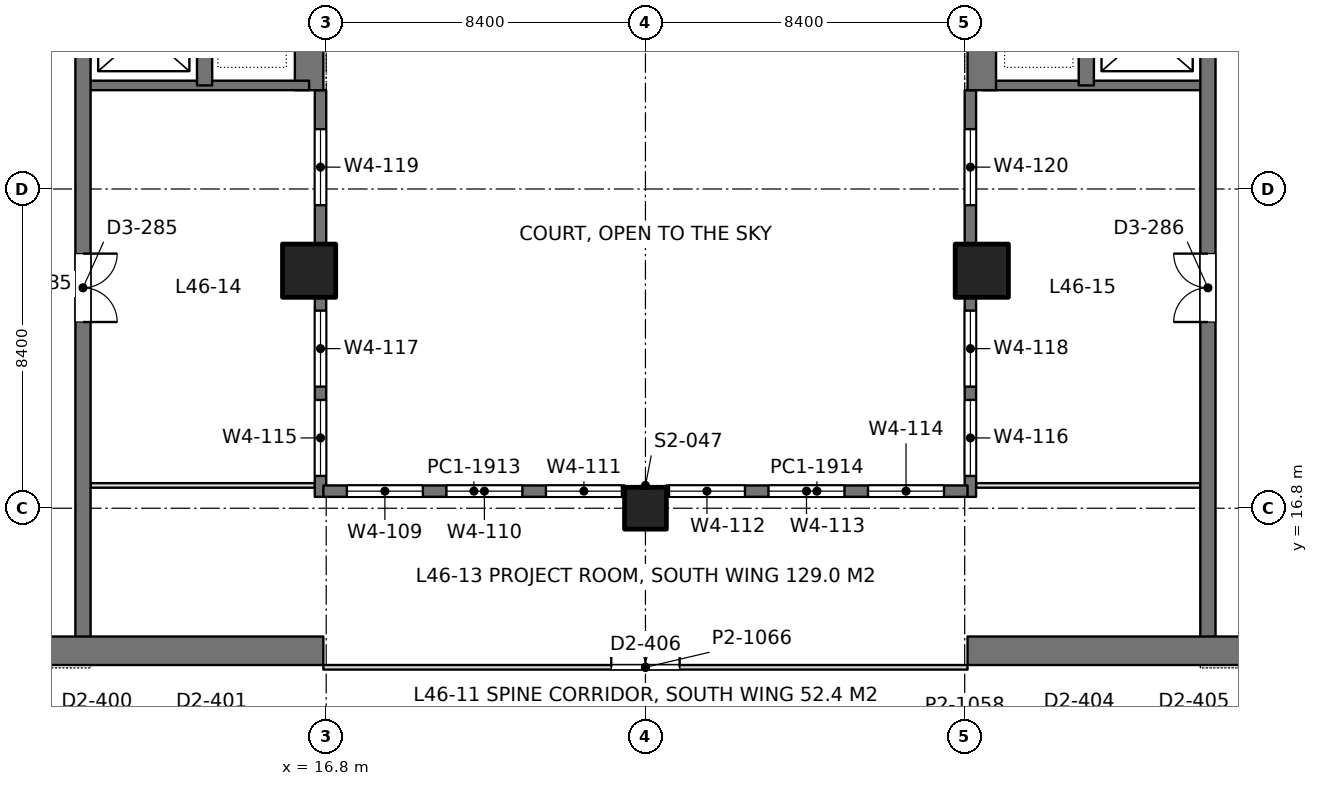
"""IFC4 building model, lengths in metres.
Left out: names, types, materials, properties, quantities, classifications, styles, units other than length and angle.
Written with IfcOpenShell. Run it as: python <this file> out.ifc"""

import sys

from ifc_helpers import new_model, si_unit, direction, frame, frame_2d, origin, origin_2d, place, context, subcontext, project, spatial, rectangle, extrude, element, fill, save


model = new_model("IFC4")
c1 = context("Model", 3, precision=1e-05, world=origin(), true_north=direction((0.0, 1.0)))
c2 = subcontext(c1, "Body", "Model", "MODEL_VIEW")
j1 = project(units=[si_unit("LENGTHUNIT", "METRE"), si_unit("PLANEANGLEUNIT", "RADIAN")], contexts=[c1])
p1 = place(None, origin())
s1 = spatial("IfcSite", under=j1, at=p1, CompositionType="ELEMENT")
p2 = place(p1, origin())
s2 = spatial("IfcBuilding", under=s1, at=p2, CompositionType="ELEMENT")
p3 = place(p2, frame((0.0, 0.0, 202.8)))
s3 = spatial("IfcBuildingStorey", under=s2, at=p3, CompositionType="ELEMENT", Elevation=202.8)
p4 = place(p3, frame((25.2, 16.8, 0.0), z_axis=(0.0, 0.0, 1.0), x_axis=(1.0, 0.0, 0.0)))
e1 = element("IfcColumn", 1, at=p4, inside=s3, PredefinedType="COLUMN", context=c2, shape_type="SweptSolid", body=[
    extrude(rectangle(XDim=1.1, YDim=1.1, at=origin_2d()), origin(), (0.0, 0.0, 1.0), 4.2),
])
for number, where, z_axis, x_axis in (
    (2, (16.35, 23.05, 0.0), (0.0, 0.0, 1.0), (1.0, 0.0, 0.0)),
    (3, (34.05, 23.05, 0.0), (0.0, 0.0, 1.0), (1.0, 0.0, 0.0)),
):
    element("IfcColumn", number, at=place(p3, frame(where, z_axis=z_axis, x_axis=x_axis)), inside=s3, PredefinedType="COLUMN", context=c2, shape_type="SweptSolid", body=[
        extrude(rectangle(XDim=1.4, YDim=1.4, at=origin_2d()), origin(), (0.0, 0.0, 1.0), 4.2),
    ])
p5 = place(p3, frame((-1.125, 13.05, 0.0), z_axis=(0.0, 0.0, 1.0), x_axis=(1.0, 0.0, 0.0)))
e4 = element("IfcWall", 4, at=p5, inside=s3, PredefinedType="SHEAR", context=c2, shape_type="SweptSolid", body=[
    extrude(rectangle(XDim=17.85, YDim=0.75, at=frame_2d((8.925, 0.0))), origin(), (0.0, 0.0, 1.0), 4.2),
])
p6 = place(p5, frame((8.875, 0.0, 0.0)))
e5 = element("IfcOpeningElement", 5, at=p6, cuts=e4, PredefinedType="OPENING", context=c2, shape_type="SweptSolid", body=[
    extrude(rectangle(XDim=1.8, YDim=2.4, at=frame_2d((0.9, 1.2))), frame((0.0, 0.385, 0.0), z_axis=(0.0, -1.0, 0.0), x_axis=(1.0, 0.0, 0.0)), (0.0, 0.0, 1.0), 0.77),
])
p7 = place(p3, frame((16.35, 27.8, 0.0), z_axis=(0.0, 0.0, 1.0), x_axis=(0.0, 1.0, 0.0)))
e6 = element("IfcWall", 6, at=p7, inside=s3, PredefinedType="SHEAR", context=c2, shape_type="SweptSolid", body=[
    extrude(rectangle(XDim=9.55, YDim=0.75, at=frame_2d((4.775, 0.0))), origin(), (0.0, 0.0, 1.0), 4.2),
])
p8 = place(p3, frame((10.4, 13.05, 0.0), z_axis=(0.0, 0.0, 1.0), x_axis=(0.0, 1.0, 0.0)))
e7 = element("IfcWall", 7, at=p8, inside=s3, PredefinedType="SHEAR", context=c2, shape_type="SweptSolid", body=[
    extrude(rectangle(XDim=24.3, YDim=0.4, at=frame_2d((12.15, 0.0))), origin(), (0.0, 0.0, 1.0), 4.2),
])
p9 = place(p8, frame((15.75, 0.0, 0.0)))
e8 = element("IfcOpeningElement", 8, at=p9, cuts=e7, PredefinedType="OPENING", context=c2, shape_type="SweptSolid", body=[
    extrude(rectangle(XDim=1.1, YDim=2.2, at=frame_2d((0.55, 1.1))), frame((0.0, 0.21, 0.0), z_axis=(0.0, -1.0, 0.0), x_axis=(1.0, 0.0, 0.0)), (0.0, 0.0, 1.0), 0.42),
])
p10 = place(p8, frame((18.6, 0.0, 0.0)))
e9 = element("IfcOpeningElement", 9, at=p10, cuts=e7, PredefinedType="OPENING", context=c2, shape_type="SweptSolid", body=[
    extrude(rectangle(XDim=1.1, YDim=2.2, at=frame_2d((0.55, 1.1))), frame((0.0, 0.21, 0.0), z_axis=(0.0, -1.0, 0.0), x_axis=(1.0, 0.0, 0.0)), (0.0, 0.0, 1.0), 0.42),
])
p11 = place(p8, frame((21.45, 0.0, 0.0)))
e10 = element("IfcOpeningElement", 10, at=p11, cuts=e7, PredefinedType="OPENING", context=c2, shape_type="SweptSolid", body=[
    extrude(rectangle(XDim=1.1, YDim=2.2, at=frame_2d((0.55, 1.1))), frame((0.0, 0.21, 0.0), z_axis=(0.0, -1.0, 0.0), x_axis=(1.0, 0.0, 0.0)), (0.0, 0.0, 1.0), 0.42),
])
p12 = place(p8, frame((8.65, 0.0, 0.0)))
e11 = element("IfcOpeningElement", 11, at=p12, cuts=e7, PredefinedType="OPENING", context=c2, shape_type="SweptSolid", body=[
    extrude(rectangle(XDim=1.8, YDim=2.4, at=frame_2d((0.9, 1.2))), frame((0.0, 0.21, 0.0), z_axis=(0.0, -1.0, 0.0), x_axis=(1.0, 0.0, 0.0)), (0.0, 0.0, 1.0), 0.42),
])
p13 = place(p3, frame((13.6, 27.925, 0.0), z_axis=(0.0, 0.0, 1.0), x_axis=(0.0, 1.0, 0.0)))
e12 = element("IfcWall", 12, at=p13, inside=s3, PredefinedType="SHEAR", context=c2, shape_type="SweptSolid", body=[
    extrude(rectangle(XDim=9.425, YDim=0.4, at=frame_2d((4.712, 0.0))), origin(), (0.0, 0.0, 1.0), 4.2),
])
p14 = place(p3, frame((10.4, 27.925, 0.0), z_axis=(0.0, 0.0, 1.0), x_axis=(1.0, 0.0, 0.0)))
e13 = element("IfcWall", 13, at=p14, inside=s3, PredefinedType="SHEAR", context=c2, shape_type="SweptSolid", body=[
    extrude(rectangle(XDim=5.95, YDim=0.25, at=frame_2d((2.975, 0.0))), origin(), (0.0, 0.0, 1.0), 4.2),
])
p15 = place(p3, frame((33.675, 13.05, 0.0), z_axis=(0.0, 0.0, 1.0), x_axis=(1.0, 0.0, 0.0)))
e14 = element("IfcWall", 14, at=p15, inside=s3, PredefinedType="SHEAR", context=c2, shape_type="SweptSolid", body=[
    extrude(rectangle(XDim=17.85, YDim=0.75, at=frame_2d((8.925, 0.0))), origin(), (0.0, 0.0, 1.0), 4.2),
])
p16 = place(p15, frame((7.175, 0.0, 0.0)))
e15 = element("IfcOpeningElement", 15, at=p16, cuts=e14, PredefinedType="OPENING", context=c2, shape_type="SweptSolid", body=[
    extrude(rectangle(XDim=1.8, YDim=2.4, at=frame_2d((0.9, 1.2))), frame((0.0, 0.385, 0.0), z_axis=(0.0, -1.0, 0.0), x_axis=(1.0, 0.0, 0.0)), (0.0, 0.0, 1.0), 0.77),
])
p17 = place(p3, frame((34.05, 27.8, 0.0), z_axis=(0.0, 0.0, 1.0), x_axis=(0.0, 1.0, 0.0)))
e16 = element("IfcWall", 16, at=p17, inside=s3, PredefinedType="SHEAR", context=c2, shape_type="SweptSolid", body=[
    extrude(rectangle(XDim=9.55, YDim=0.75, at=frame_2d((4.775, 0.0))), origin(), (0.0, 0.0, 1.0), 4.2),
])
p18 = place(p3, frame((40.0, 13.05, 0.0), z_axis=(0.0, 0.0, 1.0), x_axis=(0.0, 1.0, 0.0)))
e17 = element("IfcWall", 17, at=p18, inside=s3, PredefinedType="SHEAR", context=c2, shape_type="SweptSolid", body=[
    extrude(rectangle(XDim=24.3, YDim=0.4, at=frame_2d((12.15, 0.0))), origin(), (0.0, 0.0, 1.0), 4.2),
])
p19 = place(p18, frame((15.75, 0.0, 0.0)))
e18 = element("IfcOpeningElement", 18, at=p19, cuts=e17, PredefinedType="OPENING", context=c2, shape_type="SweptSolid", body=[
    extrude(rectangle(XDim=1.1, YDim=2.2, at=frame_2d((0.55, 1.1))), frame((0.0, 0.21, 0.0), z_axis=(0.0, -1.0, 0.0), x_axis=(1.0, 0.0, 0.0)), (0.0, 0.0, 1.0), 0.42),
])
p20 = place(p18, frame((18.6, 0.0, 0.0)))
e19 = element("IfcOpeningElement", 19, at=p20, cuts=e17, PredefinedType="OPENING", context=c2, shape_type="SweptSolid", body=[
    extrude(rectangle(XDim=1.1, YDim=2.2, at=frame_2d((0.55, 1.1))), frame((0.0, 0.21, 0.0), z_axis=(0.0, -1.0, 0.0), x_axis=(1.0, 0.0, 0.0)), (0.0, 0.0, 1.0), 0.42),
])
p21 = place(p18, frame((21.45, 0.0, 0.0)))
e20 = element("IfcOpeningElement", 20, at=p21, cuts=e17, PredefinedType="OPENING", context=c2, shape_type="SweptSolid", body=[
    extrude(rectangle(XDim=1.1, YDim=2.2, at=frame_2d((0.55, 1.1))), frame((0.0, 0.21, 0.0), z_axis=(0.0, -1.0, 0.0), x_axis=(1.0, 0.0, 0.0)), (0.0, 0.0, 1.0), 0.42),
])
p22 = place(p18, frame((8.65, 0.0, 0.0)))
e21 = element("IfcOpeningElement", 21, at=p22, cuts=e17, PredefinedType="OPENING", context=c2, shape_type="SweptSolid", body=[
    extrude(rectangle(XDim=1.8, YDim=2.4, at=frame_2d((0.9, 1.2))), frame((0.0, 0.21, 0.0), z_axis=(0.0, -1.0, 0.0), x_axis=(1.0, 0.0, 0.0)), (0.0, 0.0, 1.0), 0.42),
])
p23 = place(p3, frame((36.8, 27.925, 0.0), z_axis=(0.0, 0.0, 1.0), x_axis=(0.0, 1.0, 0.0)))
e22 = element("IfcWall", 22, at=p23, inside=s3, PredefinedType="SHEAR", context=c2, shape_type="SweptSolid", body=[
    extrude(rectangle(XDim=9.425, YDim=0.4, at=frame_2d((4.712, 0.0))), origin(), (0.0, 0.0, 1.0), 4.2),
])
p24 = place(p3, frame((40.0, 27.925, 0.0), z_axis=(0.0, 0.0, 1.0), x_axis=(-1.0, 0.0, 0.0)))
e23 = element("IfcWall", 23, at=p24, inside=s3, PredefinedType="SHEAR", context=c2, shape_type="SweptSolid", body=[
    extrude(rectangle(XDim=5.95, YDim=0.25, at=frame_2d((2.975, 0.0))), origin(), (0.0, 0.0, 1.0), 4.2),
])
p25 = place(p3, frame((16.65, 17.1, 0.0), z_axis=(0.0, 0.0, 1.0), x_axis=(0.0, 1.0, 0.0)))
e24 = element("IfcWall", 24, at=p25, inside=s3, PredefinedType="SOLIDWALL", context=c2, shape_type="SweptSolid", body=[
    extrude(rectangle(XDim=10.7, YDim=0.3, at=frame_2d((5.35, 0.0))), origin(), (0.0, 0.0, 1.0), 4.05),
])
p26 = place(p25, frame((0.55, 0.0, 0.9)))
e25 = element("IfcOpeningElement", 25, at=p26, cuts=e24, PredefinedType="OPENING", context=c2, shape_type="SweptSolid", body=[
    extrude(rectangle(XDim=2.0, YDim=1.9, at=frame_2d((1.0, 0.95))), frame((0.0, 0.16, 0.0), z_axis=(0.0, -1.0, 0.0), x_axis=(1.0, 0.0, 0.0)), (0.0, 0.0, 1.0), 0.32),
])
p27 = place(p25, frame((2.9, 0.0, 0.9)))
e26 = element("IfcOpeningElement", 26, at=p27, cuts=e24, PredefinedType="OPENING", context=c2, shape_type="SweptSolid", body=[
    extrude(rectangle(XDim=2.0, YDim=1.9, at=frame_2d((1.0, 0.95))), frame((0.0, 0.16, 0.0), z_axis=(0.0, -1.0, 0.0), x_axis=(1.0, 0.0, 0.0)), (0.0, 0.0, 1.0), 0.32),
])
p28 = place(p25, frame((7.675, 0.0, 0.9)))
e27 = element("IfcOpeningElement", 27, at=p28, cuts=e24, PredefinedType="OPENING", context=c2, shape_type="SweptSolid", body=[
    extrude(rectangle(XDim=2.0, YDim=1.9, at=frame_2d((1.0, 0.95))), frame((0.0, 0.16, 0.0), z_axis=(0.0, -1.0, 0.0), x_axis=(1.0, 0.0, 0.0)), (0.0, 0.0, 1.0), 0.32),
])
p29 = place(p3, frame((33.75, 17.1, 0.0), z_axis=(0.0, 0.0, 1.0), x_axis=(0.0, 1.0, 0.0)))
e28 = element("IfcWall", 28, at=p29, inside=s3, PredefinedType="SOLIDWALL", context=c2, shape_type="SweptSolid", body=[
    extrude(rectangle(XDim=10.7, YDim=0.3, at=frame_2d((5.35, 0.0))), origin(), (0.0, 0.0, 1.0), 4.05),
])
p30 = place(p29, frame((0.55, 0.0, 0.9)))
e29 = element("IfcOpeningElement", 29, at=p30, cuts=e28, PredefinedType="OPENING", context=c2, shape_type="SweptSolid", body=[
    extrude(rectangle(XDim=2.0, YDim=1.9, at=frame_2d((1.0, 0.95))), frame((0.0, 0.16, 0.0), z_axis=(0.0, -1.0, 0.0), x_axis=(1.0, 0.0, 0.0)), (0.0, 0.0, 1.0), 0.32),
])
p31 = place(p29, frame((2.9, 0.0, 0.9)))
e30 = element("IfcOpeningElement", 30, at=p31, cuts=e28, PredefinedType="OPENING", context=c2, shape_type="SweptSolid", body=[
    extrude(rectangle(XDim=2.0, YDim=1.9, at=frame_2d((1.0, 0.95))), frame((0.0, 0.16, 0.0), z_axis=(0.0, -1.0, 0.0), x_axis=(1.0, 0.0, 0.0)), (0.0, 0.0, 1.0), 0.32),
])
p32 = place(p29, frame((7.675, 0.0, 0.9)))
e31 = element("IfcOpeningElement", 31, at=p32, cuts=e28, PredefinedType="OPENING", context=c2, shape_type="SweptSolid", body=[
    extrude(rectangle(XDim=2.0, YDim=1.9, at=frame_2d((1.0, 0.95))), frame((0.0, 0.16, 0.0), z_axis=(0.0, -1.0, 0.0), x_axis=(1.0, 0.0, 0.0)), (0.0, 0.0, 1.0), 0.32),
])
p33 = place(p3, frame((16.725, 17.25, 0.0), z_axis=(0.0, 0.0, 1.0), x_axis=(1.0, 0.0, 0.0)))
e32 = element("IfcWall", 32, at=p33, inside=s3, PredefinedType="SOLIDWALL", context=c2, shape_type="SweptSolid", body=[
    extrude(rectangle(XDim=7.925, YDim=0.3, at=frame_2d((3.962, 0.0))), origin(), (0.0, 0.0, 1.0), 4.05),
])
p34 = place(p33, frame((0.619, 0.0, 0.9)))
e33 = element("IfcOpeningElement", 33, at=p34, cuts=e32, PredefinedType="OPENING", context=c2, shape_type="SweptSolid", body=[
    extrude(rectangle(XDim=2.0, YDim=1.9, at=frame_2d((1.0, 0.95))), frame((0.0, 0.16, 0.0), z_axis=(0.0, -1.0, 0.0), x_axis=(1.0, 0.0, 0.0)), (0.0, 0.0, 1.0), 0.32),
])
p35 = place(p33, frame((3.238, 0.0, 0.9)))
e34 = element("IfcOpeningElement", 34, at=p35, cuts=e32, PredefinedType="OPENING", context=c2, shape_type="SweptSolid", body=[
    extrude(rectangle(XDim=2.0, YDim=1.9, at=frame_2d((1.0, 0.95))), frame((0.0, 0.16, 0.0), z_axis=(0.0, -1.0, 0.0), x_axis=(1.0, 0.0, 0.0)), (0.0, 0.0, 1.0), 0.32),
])
p36 = place(p33, frame((5.856, 0.0, 0.9)))
e35 = element("IfcOpeningElement", 35, at=p36, cuts=e32, PredefinedType="OPENING", context=c2, shape_type="SweptSolid", body=[
    extrude(rectangle(XDim=2.0, YDim=1.9, at=frame_2d((1.0, 0.95))), frame((0.0, 0.16, 0.0), z_axis=(0.0, -1.0, 0.0), x_axis=(1.0, 0.0, 0.0)), (0.0, 0.0, 1.0), 0.32),
])
p37 = place(p3, frame((25.75, 17.25, 0.0), z_axis=(0.0, 0.0, 1.0), x_axis=(1.0, 0.0, 0.0)))
e36 = element("IfcWall", 36, at=p37, inside=s3, PredefinedType="SOLIDWALL", context=c2, shape_type="SweptSolid", body=[
    extrude(rectangle(XDim=7.925, YDim=0.3, at=frame_2d((3.962, 0.0))), origin(), (0.0, 0.0, 1.0), 4.05),
])
p38 = place(p37, frame((0.069, 0.0, 0.9)))
e37 = element("IfcOpeningElement", 37, at=p38, cuts=e36, PredefinedType="OPENING", context=c2, shape_type="SweptSolid", body=[
    extrude(rectangle(XDim=2.0, YDim=1.9, at=frame_2d((1.0, 0.95))), frame((0.0, 0.16, 0.0), z_axis=(0.0, -1.0, 0.0), x_axis=(1.0, 0.0, 0.0)), (0.0, 0.0, 1.0), 0.32),
])
p39 = place(p37, frame((2.688, 0.0, 0.9)))
e38 = element("IfcOpeningElement", 38, at=p39, cuts=e36, PredefinedType="OPENING", context=c2, shape_type="SweptSolid", body=[
    extrude(rectangle(XDim=2.0, YDim=1.9, at=frame_2d((1.0, 0.95))), frame((0.0, 0.16, 0.0), z_axis=(0.0, -1.0, 0.0), x_axis=(1.0, 0.0, 0.0)), (0.0, 0.0, 1.0), 0.32),
])
p40 = place(p37, frame((5.306, 0.0, 0.9)))
e39 = element("IfcOpeningElement", 39, at=p40, cuts=e36, PredefinedType="OPENING", context=c2, shape_type="SweptSolid", body=[
    extrude(rectangle(XDim=2.0, YDim=1.9, at=frame_2d((1.0, 0.95))), frame((0.0, 0.16, 0.0), z_axis=(0.0, -1.0, 0.0), x_axis=(1.0, 0.0, 0.0)), (0.0, 0.0, 1.0), 0.32),
])
for number, where, z_axis, x_axis in (
    (40, (10.598, 17.4, 0.0), (0.0, 0.0, 1.0), (1.0, 0.0, 0.0)),
    (41, (33.898, 17.4, 0.0), (0.0, 0.0, 1.0), (1.0, 0.0, 0.0)),
):
    element("IfcWall", number, at=place(p3, frame(where, z_axis=z_axis, x_axis=x_axis)), inside=s3, PredefinedType="PARTITIONING", context=c2, shape_type="SweptSolid", body=[
        extrude(rectangle(XDim=5.904, YDim=0.12, at=frame_2d((2.952, 0.0))), origin(), (0.0, 0.0, 1.0), 3.55),
    ])
p41 = place(p3, frame((16.725, 12.615, 0.0), z_axis=(0.0, 0.0, 1.0), x_axis=(1.0, 0.0, 0.0)))
e42 = element("IfcWall", 42, at=p41, inside=s3, PredefinedType="PARTITIONING", context=c2, shape_type="SweptSolid", body=[
    extrude(rectangle(XDim=16.95, YDim=0.12, at=frame_2d((8.475, 0.0))), origin(), (0.0, 0.0, 1.0), 3.55),
])
p42 = place(p41, frame((7.575, 0.0, 0.0)))
e43 = element("IfcOpeningElement", 43, at=p42, cuts=e42, PredefinedType="OPENING", context=c2, shape_type="SweptSolid", body=[
    extrude(rectangle(XDim=1.8, YDim=2.2, at=frame_2d((0.9, 1.1))), frame((0.0, 0.07, 0.0), z_axis=(0.0, -1.0, 0.0), x_axis=(1.0, 0.0, 0.0)), (0.0, 0.0, 1.0), 0.14),
])
p43 = place(p26, origin())
e44 = element("IfcWindow", 44, at=p43, inside=s3, PartitioningType="SINGLE_PANEL", PredefinedType="WINDOW", context=c2, shape_type="SweptSolid", body=[
    extrude(rectangle(XDim=2.0, YDim=1.9, at=frame_2d((1.0, 0.95))), frame((0.0, 0.03, 0.0), z_axis=(0.0, -1.0, 0.0), x_axis=(1.0, 0.0, 0.0)), (0.0, 0.0, 1.0), 0.06),
])
fill(e25, e44)
p44 = place(p27, origin())
e45 = element("IfcWindow", 45, at=p44, inside=s3, PartitioningType="SINGLE_PANEL", PredefinedType="WINDOW", context=c2, shape_type="SweptSolid", body=[
    extrude(rectangle(XDim=2.0, YDim=1.9, at=frame_2d((1.0, 0.95))), frame((0.0, 0.03, 0.0), z_axis=(0.0, -1.0, 0.0), x_axis=(1.0, 0.0, 0.0)), (0.0, 0.0, 1.0), 0.06),
])
fill(e26, e45)
p45 = place(p28, origin())
e46 = element("IfcWindow", 46, at=p45, inside=s3, PartitioningType="SINGLE_PANEL", PredefinedType="WINDOW", context=c2, shape_type="SweptSolid", body=[
    extrude(rectangle(XDim=2.0, YDim=1.9, at=frame_2d((1.0, 0.95))), frame((0.0, 0.03, 0.0), z_axis=(0.0, -1.0, 0.0), x_axis=(1.0, 0.0, 0.0)), (0.0, 0.0, 1.0), 0.06),
])
fill(e27, e46)
p46 = place(p30, origin())
e47 = element("IfcWindow", 47, at=p46, inside=s3, PartitioningType="SINGLE_PANEL", PredefinedType="WINDOW", context=c2, shape_type="SweptSolid", body=[
    extrude(rectangle(XDim=2.0, YDim=1.9, at=frame_2d((1.0, 0.95))), frame((0.0, 0.03, 0.0), z_axis=(0.0, -1.0, 0.0), x_axis=(1.0, 0.0, 0.0)), (0.0, 0.0, 1.0), 0.06),
])
fill(e29, e47)
p47 = place(p31, origin())
e48 = element("IfcWindow", 48, at=p47, inside=s3, PartitioningType="SINGLE_PANEL", PredefinedType="WINDOW", context=c2, shape_type="SweptSolid", body=[
    extrude(rectangle(XDim=2.0, YDim=1.9, at=frame_2d((1.0, 0.95))), frame((0.0, 0.03, 0.0), z_axis=(0.0, -1.0, 0.0), x_axis=(1.0, 0.0, 0.0)), (0.0, 0.0, 1.0), 0.06),
])
fill(e30, e48)
p48 = place(p32, origin())
e49 = element("IfcWindow", 49, at=p48, inside=s3, PartitioningType="SINGLE_PANEL", PredefinedType="WINDOW", context=c2, shape_type="SweptSolid", body=[
    extrude(rectangle(XDim=2.0, YDim=1.9, at=frame_2d((1.0, 0.95))), frame((0.0, 0.03, 0.0), z_axis=(0.0, -1.0, 0.0), x_axis=(1.0, 0.0, 0.0)), (0.0, 0.0, 1.0), 0.06),
])
fill(e31, e49)
p49 = place(p34, origin())
e50 = element("IfcWindow", 50, at=p49, inside=s3, PartitioningType="SINGLE_PANEL", PredefinedType="WINDOW", context=c2, shape_type="SweptSolid", body=[
    extrude(rectangle(XDim=2.0, YDim=1.9, at=frame_2d((1.0, 0.95))), frame((0.0, 0.03, 0.0), z_axis=(0.0, -1.0, 0.0), x_axis=(1.0, 0.0, 0.0)), (0.0, 0.0, 1.0), 0.06),
])
fill(e33, e50)
p50 = place(p35, origin())
e51 = element("IfcWindow", 51, at=p50, inside=s3, PartitioningType="SINGLE_PANEL", PredefinedType="WINDOW", context=c2, shape_type="SweptSolid", body=[
    extrude(rectangle(XDim=2.0, YDim=1.9, at=frame_2d((1.0, 0.95))), frame((0.0, 0.03, 0.0), z_axis=(0.0, -1.0, 0.0), x_axis=(1.0, 0.0, 0.0)), (0.0, 0.0, 1.0), 0.06),
])
fill(e34, e51)
p51 = place(p36, origin())
e52 = element("IfcWindow", 52, at=p51, inside=s3, PartitioningType="SINGLE_PANEL", PredefinedType="WINDOW", context=c2, shape_type="SweptSolid", body=[
    extrude(rectangle(XDim=2.0, YDim=1.9, at=frame_2d((1.0, 0.95))), frame((0.0, 0.03, 0.0), z_axis=(0.0, -1.0, 0.0), x_axis=(1.0, 0.0, 0.0)), (0.0, 0.0, 1.0), 0.06),
])
fill(e35, e52)
p52 = place(p38, origin())
e53 = element("IfcWindow", 53, at=p52, inside=s3, PartitioningType="SINGLE_PANEL", PredefinedType="WINDOW", context=c2, shape_type="SweptSolid", body=[
    extrude(rectangle(XDim=2.0, YDim=1.9, at=frame_2d((1.0, 0.95))), frame((0.0, 0.03, 0.0), z_axis=(0.0, -1.0, 0.0), x_axis=(1.0, 0.0, 0.0)), (0.0, 0.0, 1.0), 0.06),
])
fill(e37, e53)
p53 = place(p39, origin())
e54 = element("IfcWindow", 54, at=p53, inside=s3, PartitioningType="SINGLE_PANEL", PredefinedType="WINDOW", context=c2, shape_type="SweptSolid", body=[
    extrude(rectangle(XDim=2.0, YDim=1.9, at=frame_2d((1.0, 0.95))), frame((0.0, 0.03, 0.0), z_axis=(0.0, -1.0, 0.0), x_axis=(1.0, 0.0, 0.0)), (0.0, 0.0, 1.0), 0.06),
])
fill(e38, e54)
p54 = place(p40, origin())
e55 = element("IfcWindow", 55, at=p54, inside=s3, PartitioningType="SINGLE_PANEL", PredefinedType="WINDOW", context=c2, shape_type="SweptSolid", body=[
    extrude(rectangle(XDim=2.0, YDim=1.9, at=frame_2d((1.0, 0.95))), frame((0.0, 0.03, 0.0), z_axis=(0.0, -1.0, 0.0), x_axis=(1.0, 0.0, 0.0)), (0.0, 0.0, 1.0), 0.06),
])
fill(e39, e55)
p55 = place(p12, frame((1.8, 0.0, 0.0), z_axis=(0.0, 0.0, 1.0), x_axis=(-1.0, 0.0, 0.0)))
e56 = element("IfcDoor", 56, at=p55, inside=s3, OperationType="DOUBLE_DOOR_SINGLE_SWING", PredefinedType="DOOR", context=c2, shape_type="SweptSolid", body=[
    extrude(rectangle(XDim=1.8, YDim=2.4, at=frame_2d((0.9, 1.2))), frame((0.0, 0.025, 0.0), z_axis=(0.0, -1.0, 0.0), x_axis=(1.0, 0.0, 0.0)), (0.0, 0.0, 1.0), 0.05),
])
fill(e11, e56)
p56 = place(p22, origin())
e57 = element("IfcDoor", 57, at=p56, inside=s3, OperationType="DOUBLE_DOOR_SINGLE_SWING", PredefinedType="DOOR", context=c2, shape_type="SweptSolid", body=[
    extrude(rectangle(XDim=1.8, YDim=2.4, at=frame_2d((0.9, 1.2))), frame((0.0, 0.025, 0.0), z_axis=(0.0, -1.0, 0.0), x_axis=(1.0, 0.0, 0.0)), (0.0, 0.0, 1.0), 0.05),
])
fill(e21, e57)
p57 = place(p42, origin())
e58 = element("IfcDoor", 58, at=p57, inside=s3, OperationType="DOUBLE_DOOR_SINGLE_SWING", PredefinedType="DOOR", context=c2, shape_type="SweptSolid", body=[
    extrude(rectangle(XDim=1.8, YDim=2.2, at=frame_2d((0.9, 1.1))), frame((0.0, 0.025, 0.0), z_axis=(0.0, -1.0, 0.0), x_axis=(1.0, 0.0, 0.0)), (0.0, 0.0, 1.0), 0.05),
])
fill(e43, e58)
save(model, sys.argv[1])
